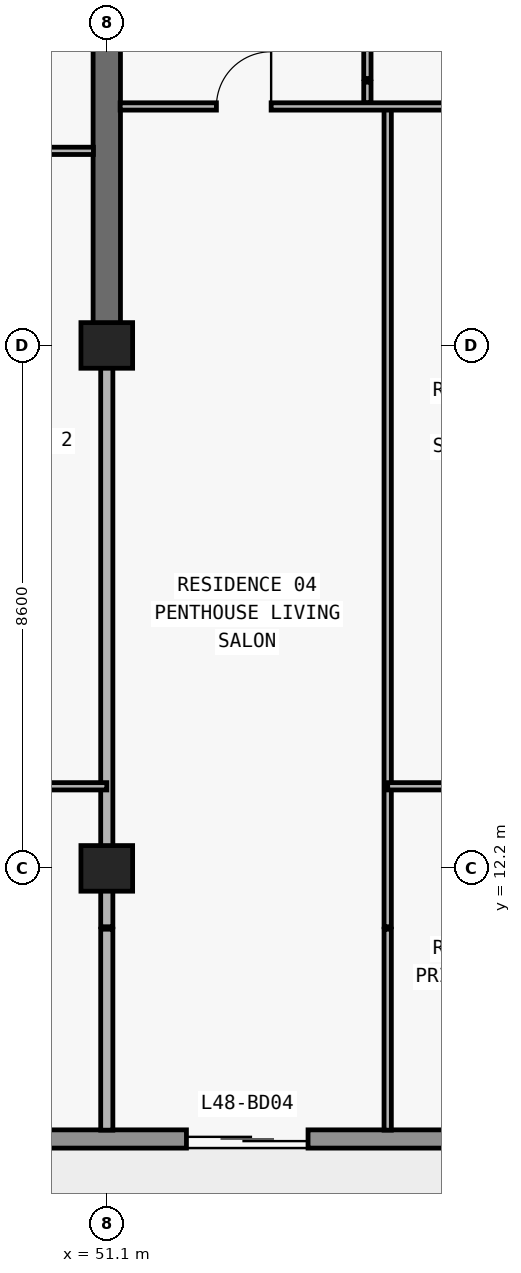
"""IFC4 building model, lengths in metres.
Left out: names, types, materials, properties, quantities, classifications, styles, units other than length and angle.
Written with IfcOpenShell. Run it as: python <this file> out.ifc"""

import sys

from ifc_helpers import new_model, si_unit, direction, frame, frame_2d, origin, origin_2d, place, context, subcontext, project, spatial, rectangle, extrude, element, fill, save


model = new_model("IFC4")
c1 = context("Model", 3, precision=1e-05, world=origin(), true_north=direction((0.0, 1.0)))
c2 = subcontext(c1, "Body", "Model", "MODEL_VIEW")
j1 = project(units=[si_unit("LENGTHUNIT", "METRE"), si_unit("PLANEANGLEUNIT", "RADIAN")], contexts=[c1])
p1 = place(None, origin())
s1 = spatial("IfcSite", under=j1, at=p1, CompositionType="ELEMENT")
p2 = place(p1, origin())
s2 = spatial("IfcBuilding", under=s1, at=p2, CompositionType="ELEMENT")
p3 = place(p2, frame((0.0, 0.0, 173.7)))
s3 = spatial("IfcBuildingStorey", under=s2, at=p3, CompositionType="ELEMENT", Elevation=173.7)
for number, where, z_axis, x_axis in (
    (1, (51.1, 12.2, 0.0), (0.0, 0.0, 1.0), (1.0, 0.0, 0.0)),
    (2, (51.1, 20.8, 0.0), (0.0, 0.0, 1.0), (1.0, 0.0, 0.0)),
):
    element("IfcColumn", number, at=place(p3, frame(where, z_axis=z_axis, x_axis=x_axis)), inside=s3, PredefinedType="COLUMN", context=c2, shape_type="SweptSolid", body=[
        extrude(rectangle(XDim=0.85, YDim=0.75, at=origin_2d()), origin(), (0.0, 0.0, 1.0), 3.05),
    ])
p4 = place(p3, frame((51.1, 20.8, 0.0), z_axis=(0.0, 0.0, 1.0), x_axis=(0.0, 1.0, 0.0)))
e3 = element("IfcWall", 3, at=p4, inside=s3, PredefinedType="SHEAR", context=c2, shape_type="SweptSolid", body=[
    extrude(rectangle(XDim=8.6, YDim=0.45, at=frame_2d((4.3, 0.0))), origin(), (0.0, 0.0, 1.0), 3.05),
])
p5 = place(p3, frame((67.7, 7.75, 0.0), z_axis=(0.0, 0.0, 1.0), x_axis=(-1.0, 0.0, 0.0)))
e4 = element("IfcWall", 4, at=p5, inside=s3, PredefinedType="STANDARD", context=c2, shape_type="SweptSolid", body=[
    extrude(rectangle(XDim=57.6, YDim=0.3, at=frame_2d((28.8, 0.0))), origin(), (0.0, 0.0, 1.0), 3.05),
])
p6 = place(p5, frame((54.673, 0.0, 0.0)))
e5 = element("IfcOpeningElement", 5, at=p6, cuts=e4, PredefinedType="OPENING", context=c2, shape_type="SweptSolid", body=[
    extrude(rectangle(XDim=2.0, YDim=2.3, at=frame_2d((1.0, 1.15))), frame((0.0, 0.16, 0.0), z_axis=(0.0, -1.0, 0.0), x_axis=(1.0, 0.0, 0.0)), (0.0, 0.0, 1.0), 0.32),
])
p7 = place(p5, frame((50.473, 0.0, 0.85)))
e6 = element("IfcOpeningElement", 6, at=p7, cuts=e4, PredefinedType="OPENING", context=c2, shape_type="SweptSolid", body=[
    extrude(rectangle(XDim=2.2, YDim=1.55, at=frame_2d((1.1, 0.775))), frame((0.0, 0.16, 0.0), z_axis=(0.0, -1.0, 0.0), x_axis=(1.0, 0.0, 0.0)), (0.0, 0.0, 1.0), 0.32),
])
p8 = place(p5, frame((46.09, 0.0, 0.0)))
e7 = element("IfcOpeningElement", 7, at=p8, cuts=e4, PredefinedType="OPENING", context=c2, shape_type="SweptSolid", body=[
    extrude(rectangle(XDim=2.0, YDim=2.3, at=frame_2d((1.0, 1.15))), frame((0.0, 0.16, 0.0), z_axis=(0.0, -1.0, 0.0), x_axis=(1.0, 0.0, 0.0)), (0.0, 0.0, 1.0), 0.32),
])
p9 = place(p5, frame((41.99, 0.0, 0.85)))
e8 = element("IfcOpeningElement", 8, at=p9, cuts=e4, PredefinedType="OPENING", context=c2, shape_type="SweptSolid", body=[
    extrude(rectangle(XDim=1.8, YDim=1.55, at=frame_2d((0.9, 0.775))), frame((0.0, 0.16, 0.0), z_axis=(0.0, -1.0, 0.0), x_axis=(1.0, 0.0, 0.0)), (0.0, 0.0, 1.0), 0.32),
])
p10 = place(p5, frame((38.09, 0.0, 0.0)))
e9 = element("IfcOpeningElement", 9, at=p10, cuts=e4, PredefinedType="OPENING", context=c2, shape_type="SweptSolid", body=[
    extrude(rectangle(XDim=2.0, YDim=2.3, at=frame_2d((1.0, 1.15))), frame((0.0, 0.16, 0.0), z_axis=(0.0, -1.0, 0.0), x_axis=(1.0, 0.0, 0.0)), (0.0, 0.0, 1.0), 0.32),
])
p11 = place(p5, frame((33.41, 0.0, 0.65)))
e10 = element("IfcOpeningElement", 10, at=p11, cuts=e4, PredefinedType="OPENING", context=c2, shape_type="SweptSolid", body=[
    extrude(rectangle(XDim=2.6, YDim=1.85, at=frame_2d((1.3, 0.925))), frame((0.0, 0.16, 0.0), z_axis=(0.0, -1.0, 0.0), x_axis=(1.0, 0.0, 0.0)), (0.0, 0.0, 1.0), 0.32),
])
p12 = place(p5, frame((27.7, 0.0, 0.85)))
e11 = element("IfcOpeningElement", 11, at=p12, cuts=e4, PredefinedType="OPENING", context=c2, shape_type="SweptSolid", body=[
    extrude(rectangle(XDim=2.2, YDim=1.55, at=frame_2d((1.1, 0.775))), frame((0.0, 0.16, 0.0), z_axis=(0.0, -1.0, 0.0), x_axis=(1.0, 0.0, 0.0)), (0.0, 0.0, 1.0), 0.32),
])
p13 = place(p5, frame((19.7, 0.0, 0.85)))
e12 = element("IfcOpeningElement", 12, at=p13, cuts=e4, PredefinedType="OPENING", context=c2, shape_type="SweptSolid", body=[
    extrude(rectangle(XDim=2.2, YDim=1.55, at=frame_2d((1.1, 0.775))), frame((0.0, 0.16, 0.0), z_axis=(0.0, -1.0, 0.0), x_axis=(1.0, 0.0, 0.0)), (0.0, 0.0, 1.0), 0.32),
])
p14 = place(p5, frame((13.29, 0.0, 0.0)))
e13 = element("IfcOpeningElement", 13, at=p14, cuts=e4, PredefinedType="OPENING", context=c2, shape_type="SweptSolid", body=[
    extrude(rectangle(XDim=2.0, YDim=2.3, at=frame_2d((1.0, 1.15))), frame((0.0, 0.16, 0.0), z_axis=(0.0, -1.0, 0.0), x_axis=(1.0, 0.0, 0.0)), (0.0, 0.0, 1.0), 0.32),
])
p15 = place(p5, frame((9.19, 0.0, 0.85)))
e14 = element("IfcOpeningElement", 14, at=p15, cuts=e4, PredefinedType="OPENING", context=c2, shape_type="SweptSolid", body=[
    extrude(rectangle(XDim=1.8, YDim=1.55, at=frame_2d((0.9, 0.775))), frame((0.0, 0.16, 0.0), z_axis=(0.0, -1.0, 0.0), x_axis=(1.0, 0.0, 0.0)), (0.0, 0.0, 1.0), 0.32),
])
p16 = place(p5, frame((5.273, 0.0, 0.0)))
e15 = element("IfcOpeningElement", 15, at=p16, cuts=e4, PredefinedType="OPENING", context=c2, shape_type="SweptSolid", body=[
    extrude(rectangle(XDim=2.0, YDim=2.3, at=frame_2d((1.0, 1.15))), frame((0.0, 0.16, 0.0), z_axis=(0.0, -1.0, 0.0), x_axis=(1.0, 0.0, 0.0)), (0.0, 0.0, 1.0), 0.32),
])
p17 = place(p5, frame((1.073, 0.0, 0.85)))
e16 = element("IfcOpeningElement", 16, at=p17, cuts=e4, PredefinedType="OPENING", context=c2, shape_type="SweptSolid", body=[
    extrude(rectangle(XDim=2.2, YDim=1.55, at=frame_2d((1.1, 0.775))), frame((0.0, 0.16, 0.0), z_axis=(0.0, -1.0, 0.0), x_axis=(1.0, 0.0, 0.0)), (0.0, 0.0, 1.0), 0.32),
])
p18 = place(p3, frame((51.1, 7.895, 0.0), z_axis=(0.0, 0.0, 1.0), x_axis=(0.0, 1.0, 0.0)))
e17 = element("IfcWall", 17, at=p18, inside=s3, PredefinedType="PARTITIONING", context=c2, shape_type="SweptSolid", body=[
    extrude(rectangle(XDim=3.305, YDim=0.2, at=frame_2d((1.652, 0.0))), origin(), (0.0, 0.0, 1.0), 3.05),
])
p19 = place(p3, frame((51.1, 11.24, 0.0), z_axis=(0.0, 0.0, 1.0), x_axis=(0.0, 1.0, 0.0)))
e18 = element("IfcWall", 18, at=p19, inside=s3, PredefinedType="PARTITIONING", context=c2, shape_type="SweptSolid", body=[
    extrude(rectangle(XDim=9.555, YDim=0.2, at=frame_2d((4.777, 0.0))), origin(), (0.0, 0.0, 1.0), 2.263),
])
p20 = place(p3, frame((55.386, 24.79, 0.0), z_axis=(0.0, 0.0, 1.0), x_axis=(0.0, 1.0, 0.0)))
e19 = element("IfcWall", 19, at=p20, inside=s3, PredefinedType="PARTITIONING", context=c2, shape_type="SweptSolid", body=[
    extrude(rectangle(XDim=0.34, YDim=0.12, at=frame_2d((0.17, 0.0))), origin(), (0.0, 0.0, 1.0), 3.05),
])
p21 = place(p3, frame((55.386, 25.19, 0.0), z_axis=(0.0, 0.0, 1.0), x_axis=(0.0, 1.0, 0.0)))
e20 = element("IfcWall", 20, at=p21, inside=s3, PredefinedType="PARTITIONING", context=c2, shape_type="SweptSolid", body=[
    extrude(rectangle(XDim=4.69, YDim=0.12, at=frame_2d((2.345, 0.0))), origin(), (0.0, 0.0, 1.0), 2.725),
])
p22 = place(p21, frame((1.895, 0.0, 0.0)))
e21 = element("IfcOpeningElement", 21, at=p22, cuts=e20, PredefinedType="OPENING", context=c2, shape_type="SweptSolid", body=[
    extrude(rectangle(XDim=0.9, YDim=2.15, at=frame_2d((0.45, 1.075))), frame((0.0, 0.07, 0.0), z_axis=(0.0, -1.0, 0.0), x_axis=(1.0, 0.0, 0.0)), (0.0, 0.0, 1.0), 0.14),
])
p23 = place(p3, frame((55.72, 7.895, 0.0), z_axis=(0.0, 0.0, 1.0), x_axis=(0.0, 1.0, 0.0)))
e22 = element("IfcWall", 22, at=p23, inside=s3, PredefinedType="PARTITIONING", context=c2, shape_type="SweptSolid", body=[
    extrude(rectangle(XDim=3.305, YDim=0.12, at=frame_2d((1.652, 0.0))), origin(), (0.0, 0.0, 1.0), 3.05),
])
p24 = place(p3, frame((55.72, 11.24, 0.0), z_axis=(0.0, 0.0, 1.0), x_axis=(0.0, 1.0, 0.0)))
e23 = element("IfcWall", 23, at=p24, inside=s3, PredefinedType="PARTITIONING", context=c2, shape_type="SweptSolid", body=[
    extrude(rectangle(XDim=13.49, YDim=0.12, at=frame_2d((6.745, 0.0))), origin(), (0.0, 0.0, 1.0), 3.05),
])
p25 = place(p3, frame((35.1, 13.55, 0.0), z_axis=(0.0, 0.0, 1.0), x_axis=(1.0, 0.0, 0.0)))
e24 = element("IfcWall", 24, at=p25, inside=s3, PredefinedType="PARTITIONING", context=c2, shape_type="SweptSolid", body=[
    extrude(rectangle(XDim=16.0, YDim=0.12, at=frame_2d((8.0, 0.0))), origin(), (0.0, 0.0, 1.0), 3.05),
])
p26 = place(p25, frame((3.35, 0.0, 0.0)))
e25 = element("IfcOpeningElement", 25, at=p26, cuts=e24, PredefinedType="OPENING", context=c2, shape_type="SweptSolid", body=[
    extrude(rectangle(XDim=0.9, YDim=2.15, at=frame_2d((0.45, 1.075))), frame((0.0, 0.07, 0.0), z_axis=(0.0, -1.0, 0.0), x_axis=(1.0, 0.0, 0.0)), (0.0, 0.0, 1.0), 0.14),
])
p27 = place(p25, frame((11.35, 0.0, 0.0)))
e26 = element("IfcOpeningElement", 26, at=p27, cuts=e24, PredefinedType="OPENING", context=c2, shape_type="SweptSolid", body=[
    extrude(rectangle(XDim=0.9, YDim=2.15, at=frame_2d((0.45, 1.075))), frame((0.0, 0.07, 0.0), z_axis=(0.0, -1.0, 0.0), x_axis=(1.0, 0.0, 0.0)), (0.0, 0.0, 1.0), 0.14),
])
p28 = place(p3, frame((55.72, 13.55, 0.0), z_axis=(0.0, 0.0, 1.0), x_axis=(1.0, 0.0, 0.0)))
e27 = element("IfcWall", 27, at=p28, inside=s3, PredefinedType="PARTITIONING", context=c2, shape_type="SweptSolid", body=[
    extrude(rectangle(XDim=3.78, YDim=0.12, at=frame_2d((1.89, 0.0))), origin(), (0.0, 0.0, 1.0), 3.05),
])
p29 = place(p28, frame((1.44, 0.0, 0.0)))
e28 = element("IfcOpeningElement", 28, at=p29, cuts=e27, PredefinedType="OPENING", context=c2, shape_type="SweptSolid", body=[
    extrude(rectangle(XDim=0.9, YDim=2.15, at=frame_2d((0.45, 1.075))), frame((0.0, 0.07, 0.0), z_axis=(0.0, -1.0, 0.0), x_axis=(1.0, 0.0, 0.0)), (0.0, 0.0, 1.0), 0.14),
])
p30 = place(p3, frame((42.7, 24.0, 0.0), z_axis=(0.0, 0.0, 1.0), x_axis=(1.0, 0.0, 0.0)))
e29 = element("IfcWall", 29, at=p30, inside=s3, PredefinedType="PARTITIONING", context=c2, shape_type="SweptSolid", body=[
    extrude(rectangle(XDim=8.18, YDim=0.12, at=frame_2d((4.09, 0.0))), origin(), (0.0, 0.0, 1.0), 3.05),
])
p31 = place(p30, frame((3.64, 0.0, 0.0)))
e30 = element("IfcOpeningElement", 30, at=p31, cuts=e29, PredefinedType="OPENING", context=c2, shape_type="SweptSolid", body=[
    extrude(rectangle(XDim=0.9, YDim=2.15, at=frame_2d((0.45, 1.075))), frame((0.0, 0.07, 0.0), z_axis=(0.0, -1.0, 0.0), x_axis=(1.0, 0.0, 0.0)), (0.0, 0.0, 1.0), 0.14),
])
p32 = place(p3, frame((51.32, 24.73, 0.0), z_axis=(0.0, 0.0, 1.0), x_axis=(1.0, 0.0, 0.0)))
e31 = element("IfcWall", 31, at=p32, inside=s3, PredefinedType="PARTITIONING", context=c2, shape_type="SweptSolid", body=[
    extrude(rectangle(XDim=8.18, YDim=0.12, at=frame_2d((4.09, 0.0))), origin(), (0.0, 0.0, 1.0), 3.05),
])
p33 = place(p32, frame((1.583, 0.0, 0.0)))
e32 = element("IfcOpeningElement", 32, at=p33, cuts=e31, PredefinedType="OPENING", context=c2, shape_type="SweptSolid", body=[
    extrude(rectangle(XDim=0.9, YDim=2.15, at=frame_2d((0.45, 1.075))), frame((0.0, 0.07, 0.0), z_axis=(0.0, -1.0, 0.0), x_axis=(1.0, 0.0, 0.0)), (0.0, 0.0, 1.0), 0.14),
])
p34 = place(p32, frame((5.84, 0.0, 0.0)))
e33 = element("IfcOpeningElement", 33, at=p34, cuts=e31, PredefinedType="OPENING", context=c2, shape_type="SweptSolid", body=[
    extrude(rectangle(XDim=0.9, YDim=2.15, at=frame_2d((0.45, 1.075))), frame((0.0, 0.07, 0.0), z_axis=(0.0, -1.0, 0.0), x_axis=(1.0, 0.0, 0.0)), (0.0, 0.0, 1.0), 0.14),
])
p35 = place(p14, origin())
e34 = element("IfcDoor", 34, at=p35, inside=s3, OperationType="DOUBLE_DOOR_SLIDING", PredefinedType="DOOR", context=c2, shape_type="SweptSolid", body=[
    extrude(rectangle(XDim=2.0, YDim=2.3, at=frame_2d((1.0, 1.15))), frame((0.0, 0.025, 0.0), z_axis=(0.0, -1.0, 0.0), x_axis=(1.0, 0.0, 0.0)), (0.0, 0.0, 1.0), 0.05),
])
fill(e13, e34)
p36 = place(p33, origin())
e35 = element("IfcDoor", 35, at=p36, inside=s3, OperationType="SINGLE_SWING_RIGHT", PredefinedType="DOOR", context=c2, shape_type="SweptSolid", body=[
    extrude(rectangle(XDim=0.9, YDim=2.15, at=frame_2d((0.45, 1.075))), frame((0.0, 0.025, 0.0), z_axis=(0.0, -1.0, 0.0), x_axis=(1.0, 0.0, 0.0)), (0.0, 0.0, 1.0), 0.05),
])
fill(e32, e35)
save(model, sys.argv[1])
